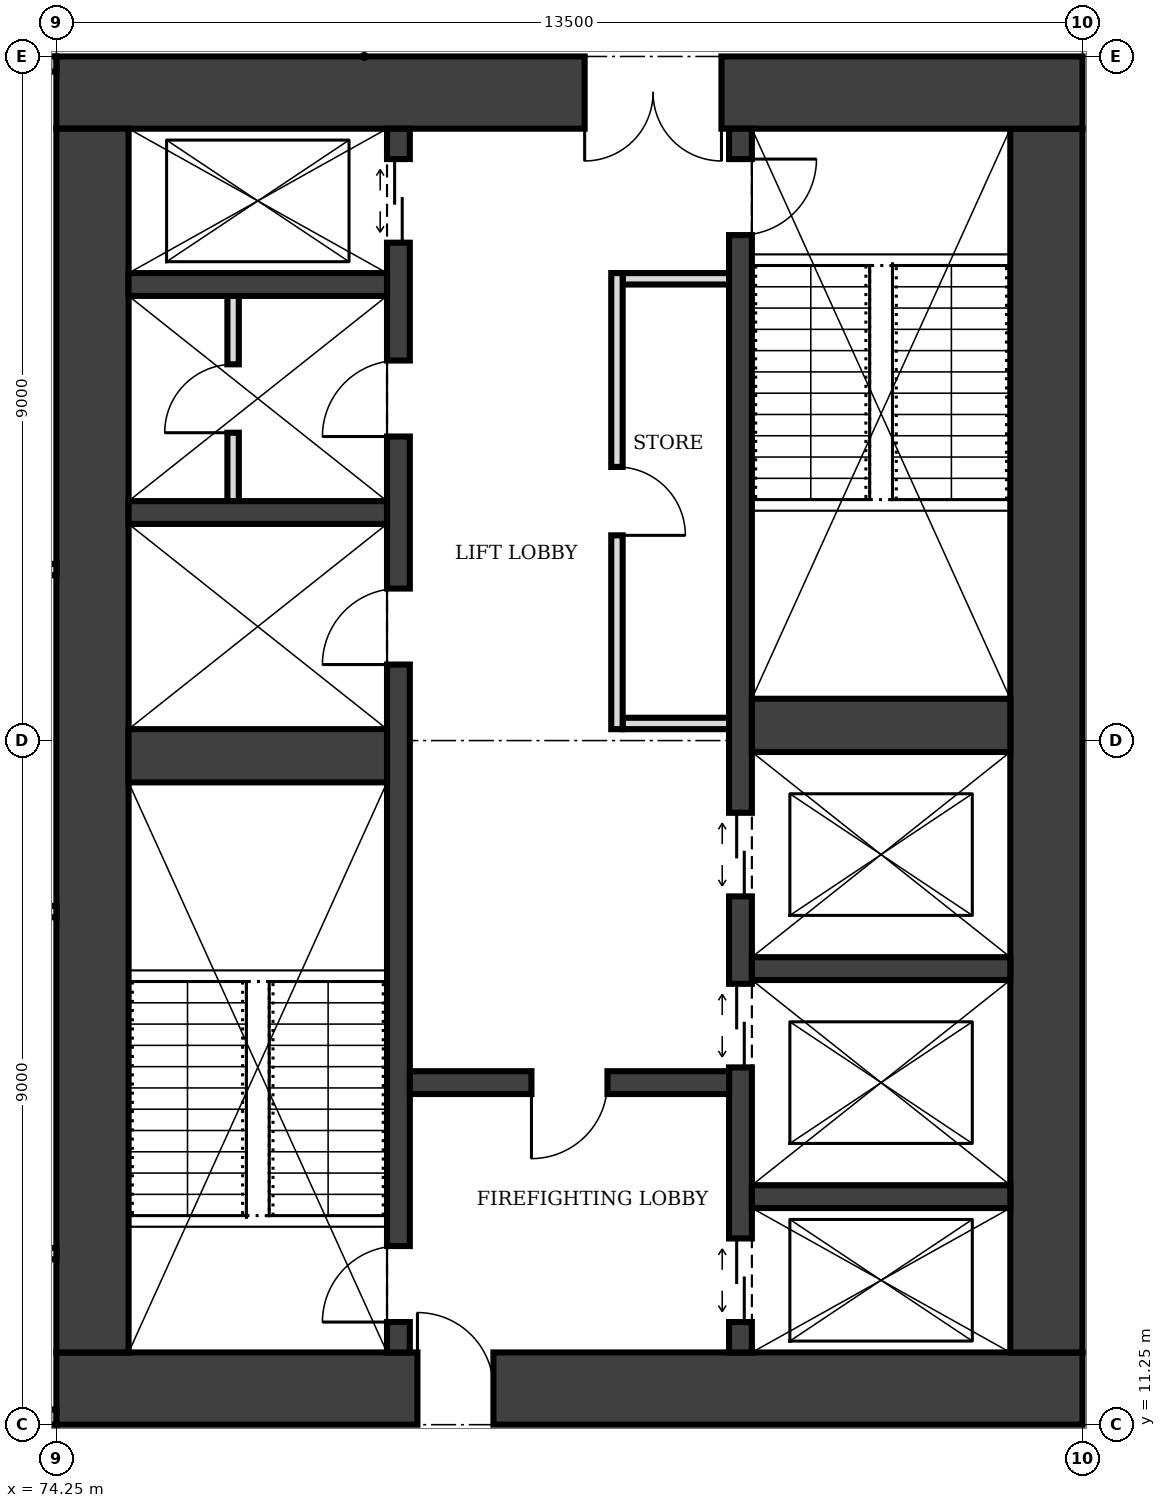
"""IFC4 building model, lengths in metres.
Left out: names, types, materials, properties, quantities, classifications, styles, units other than length and angle.
Written with IfcOpenShell. Run it as: python <this file> out.ifc"""

import sys

from ifc_helpers import new_model, si_unit, direction, frame, frame_2d, origin, place, context, subcontext, project, spatial, rectangle, extrude, element, fill, save


model = new_model("IFC4")
c1 = context("Model", 3, precision=1e-05, world=origin(), true_north=direction((0.0, 1.0)))
c2 = subcontext(c1, "Body", "Model", "MODEL_VIEW")
j1 = project(units=[si_unit("LENGTHUNIT", "METRE"), si_unit("PLANEANGLEUNIT", "RADIAN")], contexts=[c1])
p1 = place(None, origin())
s1 = spatial("IfcSite", under=j1, at=p1, CompositionType="ELEMENT")
p2 = place(p1, origin())
s2 = spatial("IfcBuilding", under=s1, at=p2, CompositionType="ELEMENT")
p3 = place(p2, frame((0.0, 0.0, 153.0)))
s3 = spatial("IfcBuildingStorey", under=s2, at=p3, CompositionType="ELEMENT", Elevation=153.0)
p4 = place(p3, frame((74.25, 11.725, 0.0), z_axis=(0.0, 0.0, 1.0), x_axis=(1.0, 0.0, 0.0)))
e1 = element("IfcWall", 1, at=p4, inside=s3, PredefinedType="SHEAR", context=c2, shape_type="SweptSolid", body=[
    extrude(rectangle(XDim=13.5, YDim=0.95, at=frame_2d((6.75, 0.0))), origin(), (0.0, 0.0, 1.0), 4.0),
])
p5 = place(p4, frame((4.75, 0.0, 0.0)))
e2 = element("IfcOpeningElement", 2, at=p5, cuts=e1, PredefinedType="OPENING", context=c2, shape_type="SweptSolid", body=[
    extrude(rectangle(XDim=1.0, YDim=2.1, at=frame_2d((0.5, 1.05))), frame((0.0, 0.485, 0.0), z_axis=(0.0, -1.0, 0.0), x_axis=(1.0, 0.0, 0.0)), (0.0, 0.0, 1.0), 0.97),
])
p6 = place(p3, frame((87.275, 12.2, 0.0), z_axis=(0.0, 0.0, 1.0), x_axis=(0.0, 1.0, 0.0)))
e3 = element("IfcWall", 3, at=p6, inside=s3, PredefinedType="SHEAR", context=c2, shape_type="SweptSolid", body=[
    extrude(rectangle(XDim=16.1, YDim=0.95, at=frame_2d((8.05, 0.0))), origin(), (0.0, 0.0, 1.0), 4.0),
])
p7 = place(p3, frame((87.75, 28.775, 0.0), z_axis=(0.0, 0.0, 1.0), x_axis=(-1.0, 0.0, 0.0)))
e4 = element("IfcWall", 4, at=p7, inside=s3, PredefinedType="SHEAR", context=c2, shape_type="SweptSolid", body=[
    extrude(rectangle(XDim=13.5, YDim=0.95, at=frame_2d((6.75, 0.0))), origin(), (0.0, 0.0, 1.0), 4.0),
])
p8 = place(p7, frame((4.75, 0.0, 0.0)))
e5 = element("IfcOpeningElement", 5, at=p8, cuts=e4, PredefinedType="OPENING", context=c2, shape_type="SweptSolid", body=[
    extrude(rectangle(XDim=1.8, YDim=2.1, at=frame_2d((0.9, 1.05))), frame((0.0, 0.485, 0.0), z_axis=(0.0, -1.0, 0.0), x_axis=(1.0, 0.0, 0.0)), (0.0, 0.0, 1.0), 0.97),
])
p9 = place(p3, frame((74.725, 28.3, 0.0), z_axis=(0.0, 0.0, 1.0), x_axis=(0.0, -1.0, 0.0)))
e6 = element("IfcWall", 6, at=p9, inside=s3, PredefinedType="SHEAR", context=c2, shape_type="SweptSolid", body=[
    extrude(rectangle(XDim=16.1, YDim=0.95, at=frame_2d((8.05, 0.0))), origin(), (0.0, 0.0, 1.0), 4.0),
])
p10 = place(p3, frame((78.75, 12.2, 0.0), z_axis=(0.0, 0.0, 1.0), x_axis=(0.0, 1.0, 0.0)))
e7 = element("IfcWall", 7, at=p10, inside=s3, PredefinedType="SHEAR", context=c2, shape_type="SweptSolid", body=[
    extrude(rectangle(XDim=16.1, YDim=0.3, at=frame_2d((8.05, 0.0))), origin(), (0.0, 0.0, 1.0), 4.0),
])
p11 = place(p10, frame((0.4, 0.0, 0.0)))
e8 = element("IfcOpeningElement", 8, at=p11, cuts=e7, PredefinedType="OPENING", context=c2, shape_type="SweptSolid", body=[
    extrude(rectangle(XDim=1.0, YDim=2.1, at=frame_2d((0.5, 1.05))), frame((0.0, 0.16, 0.0), z_axis=(0.0, -1.0, 0.0), x_axis=(1.0, 0.0, 0.0)), (0.0, 0.0, 1.0), 0.32),
])
p12 = place(p10, frame((14.6, 0.0, 0.0)))
e9 = element("IfcOpeningElement", 9, at=p12, cuts=e7, PredefinedType="OPENING", context=c2, shape_type="SweptSolid", body=[
    extrude(rectangle(XDim=1.1, YDim=2.1, at=frame_2d((0.55, 1.05))), frame((0.0, 0.16, 0.0), z_axis=(0.0, -1.0, 0.0), x_axis=(1.0, 0.0, 0.0)), (0.0, 0.0, 1.0), 0.32),
])
p13 = place(p10, frame((9.05, 0.0, 0.0)))
e10 = element("IfcOpeningElement", 10, at=p13, cuts=e7, PredefinedType="OPENING", context=c2, shape_type="SweptSolid", body=[
    extrude(rectangle(XDim=1.0, YDim=2.1, at=frame_2d((0.5, 1.05))), frame((0.0, 0.16, 0.0), z_axis=(0.0, -1.0, 0.0), x_axis=(1.0, 0.0, 0.0)), (0.0, 0.0, 1.0), 0.32),
])
p14 = place(p10, frame((12.05, 0.0, 0.0)))
e11 = element("IfcOpeningElement", 11, at=p14, cuts=e7, PredefinedType="OPENING", context=c2, shape_type="SweptSolid", body=[
    extrude(rectangle(XDim=1.0, YDim=2.1, at=frame_2d((0.5, 1.05))), frame((0.0, 0.16, 0.0), z_axis=(0.0, -1.0, 0.0), x_axis=(1.0, 0.0, 0.0)), (0.0, 0.0, 1.0), 0.32),
])
p15 = place(p3, frame((83.25, 12.2, 0.0), z_axis=(0.0, 0.0, 1.0), x_axis=(0.0, 1.0, 0.0)))
e12 = element("IfcWall", 12, at=p15, inside=s3, PredefinedType="SHEAR", context=c2, shape_type="SweptSolid", body=[
    extrude(rectangle(XDim=16.1, YDim=0.3, at=frame_2d((8.05, 0.0))), origin(), (0.0, 0.0, 1.0), 4.0),
])
p16 = place(p15, frame((14.7, 0.0, 0.0)))
e13 = element("IfcOpeningElement", 13, at=p16, cuts=e12, PredefinedType="OPENING", context=c2, shape_type="SweptSolid", body=[
    extrude(rectangle(XDim=1.0, YDim=2.1, at=frame_2d((0.5, 1.05))), frame((0.0, 0.16, 0.0), z_axis=(0.0, -1.0, 0.0), x_axis=(1.0, 0.0, 0.0)), (0.0, 0.0, 1.0), 0.32),
])
p17 = place(p15, frame((0.4, 0.0, 0.0)))
e14 = element("IfcOpeningElement", 14, at=p17, cuts=e12, PredefinedType="OPENING", context=c2, shape_type="SweptSolid", body=[
    extrude(rectangle(XDim=1.1, YDim=2.1, at=frame_2d((0.55, 1.05))), frame((0.0, 0.16, 0.0), z_axis=(0.0, -1.0, 0.0), x_axis=(1.0, 0.0, 0.0)), (0.0, 0.0, 1.0), 0.32),
])
p18 = place(p15, frame((3.75, 0.0, 0.0)))
e15 = element("IfcOpeningElement", 15, at=p18, cuts=e12, PredefinedType="OPENING", context=c2, shape_type="SweptSolid", body=[
    extrude(rectangle(XDim=1.1, YDim=2.1, at=frame_2d((0.55, 1.05))), frame((0.0, 0.16, 0.0), z_axis=(0.0, -1.0, 0.0), x_axis=(1.0, 0.0, 0.0)), (0.0, 0.0, 1.0), 0.32),
])
p19 = place(p15, frame((6.0, 0.0, 0.0)))
e16 = element("IfcOpeningElement", 16, at=p19, cuts=e12, PredefinedType="OPENING", context=c2, shape_type="SweptSolid", body=[
    extrude(rectangle(XDim=1.1, YDim=2.1, at=frame_2d((0.55, 1.05))), frame((0.0, 0.16, 0.0), z_axis=(0.0, -1.0, 0.0), x_axis=(1.0, 0.0, 0.0)), (0.0, 0.0, 1.0), 0.32),
])
p20 = place(p3, frame((75.2, 20.05, 0.0), z_axis=(0.0, 0.0, 1.0), x_axis=(1.0, 0.0, 0.0)))
e17 = element("IfcWall", 17, at=p20, inside=s3, PredefinedType="SHEAR", context=c2, shape_type="SweptSolid", body=[
    extrude(rectangle(XDim=3.4, YDim=0.7, at=frame_2d((1.7, 0.0))), origin(), (0.0, 0.0, 1.0), 4.0),
])
p21 = place(p3, frame((78.9, 15.75, 0.0), z_axis=(0.0, 0.0, 1.0), x_axis=(1.0, 0.0, 0.0)))
e18 = element("IfcWall", 18, at=p21, inside=s3, PredefinedType="SHEAR", context=c2, shape_type="SweptSolid", body=[
    extrude(rectangle(XDim=4.2, YDim=0.3, at=frame_2d((2.1, 0.0))), origin(), (0.0, 0.0, 1.0), 4.0),
])
p22 = place(p21, frame((1.6, 0.0, 0.0)))
e19 = element("IfcOpeningElement", 19, at=p22, cuts=e18, PredefinedType="OPENING", context=c2, shape_type="SweptSolid", body=[
    extrude(rectangle(XDim=1.0, YDim=2.1, at=frame_2d((0.5, 1.05))), frame((0.0, 0.16, 0.0), z_axis=(0.0, -1.0, 0.0), x_axis=(1.0, 0.0, 0.0)), (0.0, 0.0, 1.0), 0.32),
])
for number, where, z_axis, x_axis in (
    (20, (83.4, 14.25, 0.0), (0.0, 0.0, 1.0), (1.0, 0.0, 0.0)),
    (21, (83.4, 17.25, 0.0), (0.0, 0.0, 1.0), (1.0, 0.0, 0.0)),
):
    element("IfcWall", number, at=place(p3, frame(where, z_axis=z_axis, x_axis=x_axis)), inside=s3, PredefinedType="SHEAR", context=c2, shape_type="SweptSolid", body=[
        extrude(rectangle(XDim=3.4, YDim=0.3, at=frame_2d((1.7, 0.0))), origin(), (0.0, 0.0, 1.0), 4.0),
    ])
p23 = place(p3, frame((83.4, 20.45, 0.0), z_axis=(0.0, 0.0, 1.0), x_axis=(1.0, 0.0, 0.0)))
e22 = element("IfcWall", 22, at=p23, inside=s3, PredefinedType="SHEAR", context=c2, shape_type="SweptSolid", body=[
    extrude(rectangle(XDim=3.4, YDim=0.7, at=frame_2d((1.7, 0.0))), origin(), (0.0, 0.0, 1.0), 4.0),
])
for number, where, z_axis, x_axis in (
    (23, (75.2, 23.25, 0.0), (0.0, 0.0, 1.0), (1.0, 0.0, 0.0)),
    (24, (75.2, 26.25, 0.0), (0.0, 0.0, 1.0), (1.0, 0.0, 0.0)),
):
    element("IfcWall", number, at=place(p3, frame(where, z_axis=z_axis, x_axis=x_axis)), inside=s3, PredefinedType="SHEAR", context=c2, shape_type="SweptSolid", body=[
        extrude(rectangle(XDim=3.4, YDim=0.3, at=frame_2d((1.7, 0.0))), origin(), (0.0, 0.0, 1.0), 4.0),
    ])
p24 = place(p3, frame((81.625, 20.4, 0.0), z_axis=(0.0, 0.0, 1.0), x_axis=(0.0, 1.0, 0.0)))
e25 = element("IfcWall", 25, at=p24, inside=s3, PredefinedType="PARTITIONING", context=c2, shape_type="SweptSolid", body=[
    extrude(rectangle(XDim=6.0, YDim=0.15, at=frame_2d((3.0, 0.0))), origin(), (0.0, 0.0, 1.0), 3.75),
])
p25 = place(p24, frame((2.55, 0.0, 0.0)))
e26 = element("IfcOpeningElement", 26, at=p25, cuts=e25, PredefinedType="OPENING", context=c2, shape_type="SweptSolid", body=[
    extrude(rectangle(XDim=0.9, YDim=2.1, at=frame_2d((0.45, 1.05))), frame((0.0, 0.085, 0.0), z_axis=(0.0, -1.0, 0.0), x_axis=(1.0, 0.0, 0.0)), (0.0, 0.0, 1.0), 0.17),
])
for number, where, z_axis, x_axis in (
    (27, (81.7, 20.475, 0.0), (0.0, 0.0, 1.0), (1.0, 0.0, 0.0)),
    (28, (81.7, 26.325, 0.0), (0.0, 0.0, 1.0), (1.0, 0.0, 0.0)),
):
    element("IfcWall", number, at=place(p3, frame(where, z_axis=z_axis, x_axis=x_axis)), inside=s3, PredefinedType="PARTITIONING", context=c2, shape_type="SweptSolid", body=[
        extrude(rectangle(XDim=1.4, YDim=0.15, at=frame_2d((0.7, 0.0))), origin(), (0.0, 0.0, 1.0), 3.75),
    ])
p26 = place(p3, frame((76.575, 23.4, 0.0), z_axis=(0.0, 0.0, 1.0), x_axis=(0.0, 1.0, 0.0)))
e29 = element("IfcWall", 29, at=p26, inside=s3, PredefinedType="PARTITIONING", context=c2, shape_type="SweptSolid", body=[
    extrude(rectangle(XDim=2.7, YDim=0.15, at=frame_2d((1.35, 0.0))), origin(), (0.0, 0.0, 1.0), 3.75),
])
p27 = place(p26, frame((0.9, 0.0, 0.0)))
e30 = element("IfcOpeningElement", 30, at=p27, cuts=e29, PredefinedType="OPENING", context=c2, shape_type="SweptSolid", body=[
    extrude(rectangle(XDim=0.9, YDim=2.1, at=frame_2d((0.45, 1.05))), frame((0.0, 0.085, 0.0), z_axis=(0.0, -1.0, 0.0), x_axis=(1.0, 0.0, 0.0)), (0.0, 0.0, 1.0), 0.17),
])
for number, where, z_axis, x_axis in (
    (31, (68.47, 11.35, 0.0), (0.0, 0.0, 1.0), (1.0, 0.0, 0.0)),
    (32, (68.47, 29.15, 0.0), (0.0, 0.0, 1.0), (1.0, 0.0, 0.0)),
):
    element("IfcWall", number, at=place(p3, frame(where, z_axis=z_axis, x_axis=x_axis)), inside=s3, PredefinedType="SOLIDWALL", context=c2, shape_type="SweptSolid", body=[
        extrude(rectangle(XDim=5.78, YDim=0.2, at=frame_2d((2.89, 0.0))), origin(), (0.0, 0.0, 1.0), 2.85),
    ])
for number, where, z_axis, x_axis in (
    (33, (65.15, 13.5, 0.0), (0.0, 0.0, 1.0), (1.0, 0.0, 0.0)),
    (34, (65.15, 18.0, 0.0), (0.0, 0.0, 1.0), (1.0, 0.0, 0.0)),
    (35, (65.15, 22.5, 0.0), (0.0, 0.0, 1.0), (1.0, 0.0, 0.0)),
):
    element("IfcWall", number, at=place(p3, frame(where, z_axis=z_axis, x_axis=x_axis)), inside=s3, PredefinedType="PARTITIONING", context=c2, shape_type="SweptSolid", body=[
        extrude(rectangle(XDim=9.1, YDim=0.15, at=frame_2d((4.55, 0.0))), origin(), (0.0, 0.0, 1.0), 3.75),
    ])
p28 = place(p5, origin())
e36 = element("IfcDoor", 36, at=p28, inside=s3, OperationType="SINGLE_SWING_LEFT", PredefinedType="DOOR", context=c2, shape_type="SweptSolid", body=[
    extrude(rectangle(XDim=1.0, YDim=2.1, at=frame_2d((0.5, 1.05))), frame((0.0, 0.025, 0.0), z_axis=(0.0, -1.0, 0.0), x_axis=(1.0, 0.0, 0.0)), (0.0, 0.0, 1.0), 0.05),
])
fill(e2, e36)
p29 = place(p8, origin())
e37 = element("IfcDoor", 37, at=p29, inside=s3, OperationType="DOUBLE_DOOR_SINGLE_SWING", PredefinedType="DOOR", context=c2, shape_type="SweptSolid", body=[
    extrude(rectangle(XDim=1.8, YDim=2.1, at=frame_2d((0.9, 1.05))), frame((0.0, 0.025, 0.0), z_axis=(0.0, -1.0, 0.0), x_axis=(1.0, 0.0, 0.0)), (0.0, 0.0, 1.0), 0.05),
])
fill(e5, e37)
p30 = place(p22, frame((1.0, 0.0, 0.0), z_axis=(0.0, 0.0, 1.0), x_axis=(-1.0, 0.0, 0.0)))
e38 = element("IfcDoor", 38, at=p30, inside=s3, OperationType="SINGLE_SWING_RIGHT", PredefinedType="DOOR", context=c2, shape_type="SweptSolid", body=[
    extrude(rectangle(XDim=1.0, YDim=2.1, at=frame_2d((0.5, 1.05))), frame((0.0, 0.025, 0.0), z_axis=(0.0, -1.0, 0.0), x_axis=(1.0, 0.0, 0.0)), (0.0, 0.0, 1.0), 0.05),
])
fill(e19, e38)
p31 = place(p11, origin())
e39 = element("IfcDoor", 39, at=p31, inside=s3, OperationType="SINGLE_SWING_LEFT", PredefinedType="DOOR", context=c2, shape_type="SweptSolid", body=[
    extrude(rectangle(XDim=1.0, YDim=2.1, at=frame_2d((0.5, 1.05))), frame((0.0, 0.025, 0.0), z_axis=(0.0, -1.0, 0.0), x_axis=(1.0, 0.0, 0.0)), (0.0, 0.0, 1.0), 0.05),
])
fill(e8, e39)
p32 = place(p16, frame((1.0, 0.0, 0.0), z_axis=(0.0, 0.0, 1.0), x_axis=(-1.0, 0.0, 0.0)))
e40 = element("IfcDoor", 40, at=p32, inside=s3, OperationType="SINGLE_SWING_LEFT", PredefinedType="DOOR", context=c2, shape_type="SweptSolid", body=[
    extrude(rectangle(XDim=1.0, YDim=2.1, at=frame_2d((0.5, 1.05))), frame((0.0, 0.025, 0.0), z_axis=(0.0, -1.0, 0.0), x_axis=(1.0, 0.0, 0.0)), (0.0, 0.0, 1.0), 0.05),
])
fill(e13, e40)
p33 = place(p17, origin())
e41 = element("IfcDoor", 41, at=p33, inside=s3, OperationType="DOUBLE_DOOR_SLIDING", PredefinedType="DOOR", context=c2, shape_type="SweptSolid", body=[
    extrude(rectangle(XDim=1.1, YDim=2.1, at=frame_2d((0.55, 1.05))), frame((0.0, 0.025, 0.0), z_axis=(0.0, -1.0, 0.0), x_axis=(1.0, 0.0, 0.0)), (0.0, 0.0, 1.0), 0.05),
])
fill(e14, e41)
p34 = place(p12, origin())
e42 = element("IfcDoor", 42, at=p34, inside=s3, OperationType="DOUBLE_DOOR_SLIDING", PredefinedType="DOOR", context=c2, shape_type="SweptSolid", body=[
    extrude(rectangle(XDim=1.1, YDim=2.1, at=frame_2d((0.55, 1.05))), frame((0.0, 0.025, 0.0), z_axis=(0.0, -1.0, 0.0), x_axis=(1.0, 0.0, 0.0)), (0.0, 0.0, 1.0), 0.05),
])
fill(e9, e42)
p35 = place(p18, origin())
e43 = element("IfcDoor", 43, at=p35, inside=s3, OperationType="DOUBLE_DOOR_SLIDING", PredefinedType="DOOR", context=c2, shape_type="SweptSolid", body=[
    extrude(rectangle(XDim=1.1, YDim=2.1, at=frame_2d((0.55, 1.05))), frame((0.0, 0.025, 0.0), z_axis=(0.0, -1.0, 0.0), x_axis=(1.0, 0.0, 0.0)), (0.0, 0.0, 1.0), 0.05),
])
fill(e15, e43)
p36 = place(p19, origin())
e44 = element("IfcDoor", 44, at=p36, inside=s3, OperationType="DOUBLE_DOOR_SLIDING", PredefinedType="DOOR", context=c2, shape_type="SweptSolid", body=[
    extrude(rectangle(XDim=1.1, YDim=2.1, at=frame_2d((0.55, 1.05))), frame((0.0, 0.025, 0.0), z_axis=(0.0, -1.0, 0.0), x_axis=(1.0, 0.0, 0.0)), (0.0, 0.0, 1.0), 0.05),
])
fill(e16, e44)
p37 = place(p25, frame((0.9, 0.0, 0.0), z_axis=(0.0, 0.0, 1.0), x_axis=(-1.0, 0.0, 0.0)))
e45 = element("IfcDoor", 45, at=p37, inside=s3, OperationType="SINGLE_SWING_RIGHT", PredefinedType="DOOR", context=c2, shape_type="SweptSolid", body=[
    extrude(rectangle(XDim=0.9, YDim=2.1, at=frame_2d((0.45, 1.05))), frame((0.0, 0.025, 0.0), z_axis=(0.0, -1.0, 0.0), x_axis=(1.0, 0.0, 0.0)), (0.0, 0.0, 1.0), 0.05),
])
fill(e26, e45)
p38 = place(p13, origin())
e46 = element("IfcDoor", 46, at=p38, inside=s3, OperationType="SINGLE_SWING_LEFT", PredefinedType="DOOR", context=c2, shape_type="SweptSolid", body=[
    extrude(rectangle(XDim=1.0, YDim=2.1, at=frame_2d((0.5, 1.05))), frame((0.0, 0.025, 0.0), z_axis=(0.0, -1.0, 0.0), x_axis=(1.0, 0.0, 0.0)), (0.0, 0.0, 1.0), 0.05),
])
fill(e10, e46)
p39 = place(p14, origin())
e47 = element("IfcDoor", 47, at=p39, inside=s3, OperationType="SINGLE_SWING_LEFT", PredefinedType="DOOR", context=c2, shape_type="SweptSolid", body=[
    extrude(rectangle(XDim=1.0, YDim=2.1, at=frame_2d((0.5, 1.05))), frame((0.0, 0.025, 0.0), z_axis=(0.0, -1.0, 0.0), x_axis=(1.0, 0.0, 0.0)), (0.0, 0.0, 1.0), 0.05),
])
fill(e11, e47)
p40 = place(p27, origin())
e48 = element("IfcDoor", 48, at=p40, inside=s3, OperationType="SINGLE_SWING_LEFT", PredefinedType="DOOR", context=c2, shape_type="SweptSolid", body=[
    extrude(rectangle(XDim=0.9, YDim=2.1, at=frame_2d((0.45, 1.05))), frame((0.0, 0.025, 0.0), z_axis=(0.0, -1.0, 0.0), x_axis=(1.0, 0.0, 0.0)), (0.0, 0.0, 1.0), 0.05),
])
fill(e30, e48)
save(model, sys.argv[1])
